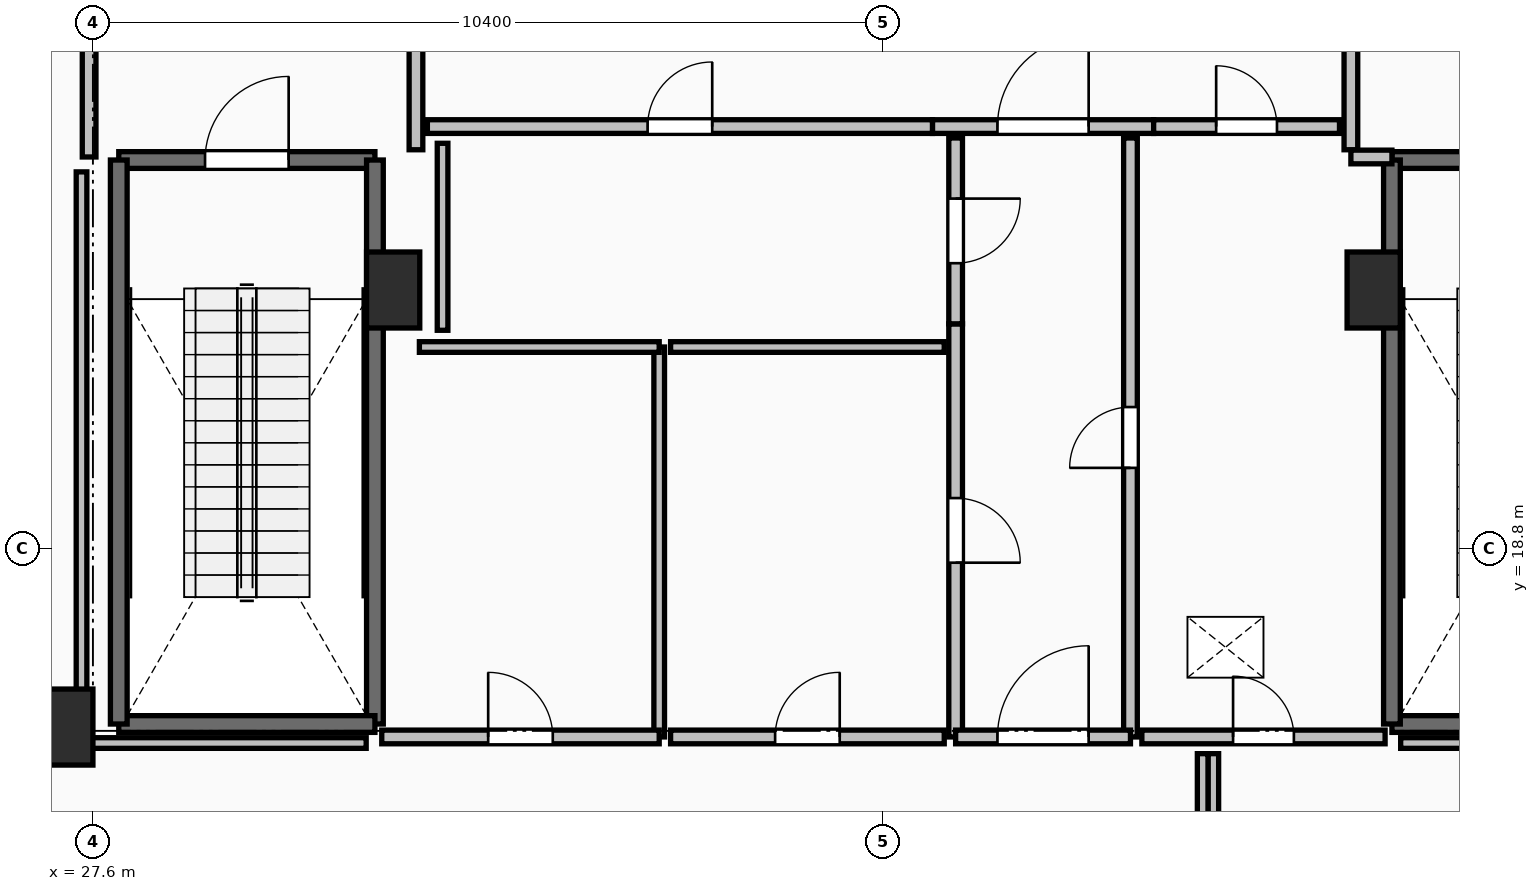
"""IFC4 building model, lengths in metres.
Left out: names, types, materials, properties, quantities, classifications, styles, units other than length and angle.
Written with IfcOpenShell. Run it as: python <this file> out.ifc"""

import sys

from ifc_helpers import new_model, si_unit, direction, frame, frame_2d, origin, origin_2d, place, context, subcontext, project, spatial, rectangle, extrude, element, fill, save


model = new_model("IFC4")
c1 = context("Model", 3, precision=1e-05, world=origin(), true_north=direction((0.0, 1.0)))
c2 = subcontext(c1, "Body", "Model", "MODEL_VIEW")
j1 = project(units=[si_unit("LENGTHUNIT", "METRE"), si_unit("PLANEANGLEUNIT", "RADIAN")], contexts=[c1])
p1 = place(None, origin())
s1 = spatial("IfcSite", under=j1, at=p1, CompositionType="ELEMENT")
p2 = place(p1, origin())
s2 = spatial("IfcBuilding", under=s1, at=p2, CompositionType="ELEMENT")
p3 = place(p2, frame((0.0, 0.0, 290.4)))
s3 = spatial("IfcBuildingStorey", under=s2, at=p3, CompositionType="ELEMENT", Elevation=290.4)
for number, where, z_axis, x_axis in (
    (1, (27.25, 16.45, 0.0), (0.0, 0.0, 1.0), (1.0, 0.0, 0.0)),
    (2, (31.55, 22.2, 0.0), (0.0, 0.0, 1.0), (1.0, 0.0, 0.0)),
    (3, (44.45, 22.2, 0.0), (0.0, 0.0, 1.0), (1.0, 0.0, 0.0)),
):
    element("IfcColumn", number, at=place(p3, frame(where, z_axis=z_axis, x_axis=x_axis)), inside=s3, PredefinedType="PILASTER", context=c2, shape_type="SweptSolid", body=[
        extrude(rectangle(XDim=0.7, YDim=1.0, at=origin_2d()), origin(), (0.0, 0.0, 1.0), 5.0),
    ])
p4 = place(p3, frame((27.94, 23.91, 0.0), z_axis=(0.0, 0.0, 1.0), x_axis=(1.0, 0.0, 0.0)))
e4 = element("IfcWall", 4, at=p4, inside=s3, PredefinedType="SOLIDWALL", context=c2, shape_type="SweptSolid", body=[
    extrude(rectangle(XDim=3.37, YDim=0.22, at=frame_2d((1.685, 0.0))), origin(), (0.0, 0.0, 1.0), 4.72),
])
p5 = place(p4, frame((1.135, 0.0, 0.0)))
e5 = element("IfcOpeningElement", 5, at=p5, cuts=e4, PredefinedType="OPENING", context=c2, shape_type="SweptSolid", body=[
    extrude(rectangle(XDim=1.1, YDim=2.15, at=frame_2d((0.55, 1.075))), frame((0.0, 0.125, 0.0), z_axis=(0.0, -1.0, 0.0), x_axis=(1.0, 0.0, 0.0)), (0.0, 0.0, 1.0), 0.25),
])
p6 = place(p3, frame((31.31, 23.91, 0.0), z_axis=(0.0, 0.0, 1.0), x_axis=(0.0, -1.0, 0.0)))
e6 = element("IfcWall", 6, at=p6, inside=s3, PredefinedType="SOLIDWALL", context=c2, shape_type="SweptSolid", body=[
    extrude(rectangle(XDim=7.42, YDim=0.22, at=frame_2d((3.71, 0.0))), origin(), (0.0, 0.0, 1.0), 4.72),
])
p7 = place(p3, frame((31.31, 16.49, 0.0), z_axis=(0.0, 0.0, 1.0), x_axis=(-1.0, 0.0, 0.0)))
e7 = element("IfcWall", 7, at=p7, inside=s3, PredefinedType="SOLIDWALL", context=c2, shape_type="SweptSolid", body=[
    extrude(rectangle(XDim=3.37, YDim=0.22, at=frame_2d((1.685, 0.0))), origin(), (0.0, 0.0, 1.0), 4.72),
])
p8 = place(p3, frame((27.94, 16.49, 0.0), z_axis=(0.0, 0.0, 1.0), x_axis=(0.0, 1.0, 0.0)))
e8 = element("IfcWall", 8, at=p8, inside=s3, PredefinedType="SOLIDWALL", context=c2, shape_type="SweptSolid", body=[
    extrude(rectangle(XDim=7.42, YDim=0.22, at=frame_2d((3.71, 0.0))), origin(), (0.0, 0.0, 1.0), 4.72),
])
p9 = place(p3, frame((44.69, 23.91, 0.0), z_axis=(0.0, 0.0, 1.0), x_axis=(1.0, 0.0, 0.0)))
e9 = element("IfcWall", 9, at=p9, inside=s3, PredefinedType="SOLIDWALL", context=c2, shape_type="SweptSolid", body=[
    extrude(rectangle(XDim=3.37, YDim=0.22, at=frame_2d((1.685, 0.0))), origin(), (0.0, 0.0, 1.0), 4.72),
])
p10 = place(p9, frame((1.135, 0.0, 0.0)))
e10 = element("IfcOpeningElement", 10, at=p10, cuts=e9, PredefinedType="OPENING", context=c2, shape_type="SweptSolid", body=[
    extrude(rectangle(XDim=1.1, YDim=2.15, at=frame_2d((0.55, 1.075))), frame((0.0, 0.125, 0.0), z_axis=(0.0, -1.0, 0.0), x_axis=(1.0, 0.0, 0.0)), (0.0, 0.0, 1.0), 0.25),
])
p11 = place(p3, frame((48.06, 16.49, 0.0), z_axis=(0.0, 0.0, 1.0), x_axis=(-1.0, 0.0, 0.0)))
e11 = element("IfcWall", 11, at=p11, inside=s3, PredefinedType="SOLIDWALL", context=c2, shape_type="SweptSolid", body=[
    extrude(rectangle(XDim=3.37, YDim=0.22, at=frame_2d((1.685, 0.0))), origin(), (0.0, 0.0, 1.0), 4.72),
])
p12 = place(p3, frame((44.69, 16.49, 0.0), z_axis=(0.0, 0.0, 1.0), x_axis=(0.0, 1.0, 0.0)))
e12 = element("IfcWall", 12, at=p12, inside=s3, PredefinedType="SOLIDWALL", context=c2, shape_type="SweptSolid", body=[
    extrude(rectangle(XDim=7.42, YDim=0.22, at=frame_2d((3.71, 0.0))), origin(), (0.0, 0.0, 1.0), 4.72),
])
p13 = place(p3, frame((31.85, 24.045, 0.0), z_axis=(0.0, 0.0, 1.0), x_axis=(0.0, 1.0, 0.0)))
e13 = element("IfcWall", 13, at=p13, inside=s3, PredefinedType="PARTITIONING", context=c2, shape_type="SweptSolid", body=[
    extrude(rectangle(XDim=3.91, YDim=0.18, at=frame_2d((1.955, 0.0))), origin(), (0.0, 0.0, 1.0), 4.72),
])
p14 = place(p13, frame((1.355, 0.0, 0.0)))
e14 = element("IfcOpeningElement", 14, at=p14, cuts=e13, PredefinedType="OPENING", context=c2, shape_type="SweptSolid", body=[
    extrude(rectangle(XDim=1.2, YDim=2.15, at=frame_2d((0.6, 1.075))), frame((0.0, 0.105, 0.0), z_axis=(0.0, -1.0, 0.0), x_axis=(1.0, 0.0, 0.0)), (0.0, 0.0, 1.0), 0.21),
])
p15 = place(p3, frame((27.55, 28.0, 0.0), z_axis=(0.0, 0.0, 1.0), x_axis=(0.0, -1.0, 0.0)))
e15 = element("IfcWall", 15, at=p15, inside=s3, PredefinedType="PARTITIONING", context=c2, shape_type="SweptSolid", body=[
    extrude(rectangle(XDim=4.05, YDim=0.18, at=frame_2d((2.025, 0.0))), origin(), (0.0, 0.0, 1.0), 4.72),
])
p16 = place(p15, frame((1.425, 0.0, 0.0)))
e16 = element("IfcOpeningElement", 16, at=p16, cuts=e15, PredefinedType="OPENING", context=c2, shape_type="SweptSolid", body=[
    extrude(rectangle(XDim=1.2, YDim=2.15, at=frame_2d((0.6, 1.075))), frame((0.0, 0.105, 0.0), z_axis=(0.0, -1.0, 0.0), x_axis=(1.0, 0.0, 0.0)), (0.0, 0.0, 1.0), 0.21),
])
p17 = place(p3, frame((44.15, 27.955, 0.0), z_axis=(0.0, 0.0, 1.0), x_axis=(0.0, -1.0, 0.0)))
e17 = element("IfcWall", 17, at=p17, inside=s3, PredefinedType="PARTITIONING", context=c2, shape_type="SweptSolid", body=[
    extrude(rectangle(XDim=3.91, YDim=0.18, at=frame_2d((1.955, 0.0))), origin(), (0.0, 0.0, 1.0), 4.72),
])
p18 = place(p17, frame((1.355, 0.0, 0.0)))
e18 = element("IfcOpeningElement", 18, at=p18, cuts=e17, PredefinedType="OPENING", context=c2, shape_type="SweptSolid", body=[
    extrude(rectangle(XDim=1.2, YDim=2.15, at=frame_2d((0.6, 1.075))), frame((0.0, 0.105, 0.0), z_axis=(0.0, -1.0, 0.0), x_axis=(1.0, 0.0, 0.0)), (0.0, 0.0, 1.0), 0.21),
])
p19 = place(p3, frame((44.15, 23.95, 0.0), z_axis=(0.0, 0.0, 1.0), x_axis=(1.0, 0.0, 0.0)))
e19 = element("IfcWall", 19, at=p19, inside=s3, PredefinedType="PARTITIONING", context=c2, shape_type="SweptSolid", body=[
    extrude(rectangle(XDim=0.54, YDim=0.18, at=frame_2d((0.27, 0.0))), origin(), (0.0, 0.0, 1.0), 4.72),
])
p20 = place(p3, frame((38.645, 24.35, 0.0), z_axis=(0.0, 0.0, 1.0), x_axis=(1.0, 0.0, 0.0)))
e20 = element("IfcWall", 20, at=p20, inside=s3, PredefinedType="PARTITIONING", context=c2, shape_type="SweptSolid", body=[
    extrude(rectangle(XDim=2.91, YDim=0.18, at=frame_2d((1.455, 0.0))), origin(), (0.0, 0.0, 1.0), 4.72),
])
p21 = place(p20, frame((0.855, 0.0, 0.0)))
e21 = element("IfcOpeningElement", 21, at=p21, cuts=e20, PredefinedType="OPENING", context=c2, shape_type="SweptSolid", body=[
    extrude(rectangle(XDim=1.2, YDim=2.15, at=frame_2d((0.6, 1.075))), frame((0.0, 0.105, 0.0), z_axis=(0.0, -1.0, 0.0), x_axis=(1.0, 0.0, 0.0)), (0.0, 0.0, 1.0), 0.21),
])
p22 = place(p3, frame((41.555, 24.35, 0.0), z_axis=(0.0, 0.0, 1.0), x_axis=(1.0, 0.0, 0.0)))
e22 = element("IfcWall", 22, at=p22, inside=s3, PredefinedType="PARTITIONING", context=c2, shape_type="SweptSolid", body=[
    extrude(rectangle(XDim=2.445, YDim=0.18, at=frame_2d((1.223, 0.0))), origin(), (0.0, 0.0, 1.0), 4.72),
])
p23 = place(p22, frame((0.823, 0.0, 0.0)))
e23 = element("IfcOpeningElement", 23, at=p23, cuts=e22, PredefinedType="OPENING", context=c2, shape_type="SweptSolid", body=[
    extrude(rectangle(XDim=0.8, YDim=2.05, at=frame_2d((0.4, 1.025))), frame((0.0, 0.105, 0.0), z_axis=(0.0, -1.0, 0.0), x_axis=(1.0, 0.0, 0.0)), (0.0, 0.0, 1.0), 0.21),
])
p24 = place(p3, frame((32.0, 24.35, 0.0), z_axis=(0.0, 0.0, 1.0), x_axis=(1.0, 0.0, 0.0)))
e24 = element("IfcWall", 24, at=p24, inside=s3, PredefinedType="PARTITIONING", context=c2, shape_type="SweptSolid", body=[
    extrude(rectangle(XDim=6.645, YDim=0.18, at=frame_2d((3.323, 0.0))), origin(), (0.0, 0.0, 1.0), 4.72),
])
p25 = place(p24, frame((2.897, 0.0, 0.0)))
e25 = element("IfcOpeningElement", 25, at=p25, cuts=e24, PredefinedType="OPENING", context=c2, shape_type="SweptSolid", body=[
    extrude(rectangle(XDim=0.85, YDim=2.1, at=frame_2d((0.425, 1.05))), frame((0.0, 0.105, 0.0), z_axis=(0.0, -1.0, 0.0), x_axis=(1.0, 0.0, 0.0)), (0.0, 0.0, 1.0), 0.21),
])
p26 = place(p3, frame((41.25, 16.32, 0.0), z_axis=(0.0, 0.0, 1.0), x_axis=(0.0, 1.0, 0.0)))
e26 = element("IfcWall", 26, at=p26, inside=s3, PredefinedType="PARTITIONING", context=c2, shape_type="SweptSolid", body=[
    extrude(rectangle(XDim=7.88, YDim=0.18, at=frame_2d((3.94, 0.0))), origin(), (0.0, 0.0, 1.0), 3.912),
])
p27 = place(p26, frame((3.54, 0.0, 0.0)))
e27 = element("IfcOpeningElement", 27, at=p27, cuts=e26, PredefinedType="OPENING", context=c2, shape_type="SweptSolid", body=[
    extrude(rectangle(XDim=0.8, YDim=2.05, at=frame_2d((0.4, 1.025))), frame((0.0, 0.105, 0.0), z_axis=(0.0, -1.0, 0.0), x_axis=(1.0, 0.0, 0.0)), (0.0, 0.0, 1.0), 0.21),
])
p28 = place(p3, frame((38.95, 21.755, 0.0), z_axis=(0.0, 0.0, 1.0), x_axis=(0.0, -1.0, 0.0)))
e28 = element("IfcWall", 28, at=p28, inside=s3, PredefinedType="PARTITIONING", context=c2, shape_type="SweptSolid", body=[
    extrude(rectangle(XDim=5.435, YDim=0.18, at=frame_2d((2.717, 0.0))), origin(), (0.0, 0.0, 1.0), 4.72),
])
p29 = place(p28, frame((2.292, 0.0, 0.0)))
e29 = element("IfcOpeningElement", 29, at=p29, cuts=e28, PredefinedType="OPENING", context=c2, shape_type="SweptSolid", body=[
    extrude(rectangle(XDim=0.85, YDim=2.1, at=frame_2d((0.425, 1.05))), frame((0.0, 0.105, 0.0), z_axis=(0.0, -1.0, 0.0), x_axis=(1.0, 0.0, 0.0)), (0.0, 0.0, 1.0), 0.21),
])
p30 = place(p3, frame((38.95, 24.2, 0.0), z_axis=(0.0, 0.0, 1.0), x_axis=(0.0, -1.0, 0.0)))
e30 = element("IfcWall", 30, at=p30, inside=s3, PredefinedType="PARTITIONING", context=c2, shape_type="SweptSolid", body=[
    extrude(rectangle(XDim=2.445, YDim=0.18, at=frame_2d((1.223, 0.0))), origin(), (0.0, 0.0, 1.0), 3.912),
])
p31 = place(p30, frame((0.798, 0.0, 0.0)))
e31 = element("IfcOpeningElement", 31, at=p31, cuts=e30, PredefinedType="OPENING", context=c2, shape_type="SweptSolid", body=[
    extrude(rectangle(XDim=0.85, YDim=2.1, at=frame_2d((0.425, 1.05))), frame((0.0, 0.105, 0.0), z_axis=(0.0, -1.0, 0.0), x_axis=(1.0, 0.0, 0.0)), (0.0, 0.0, 1.0), 0.21),
])
p32 = place(p3, frame((38.95, 16.32, 0.0), z_axis=(0.0, 0.0, 1.0), x_axis=(1.0, 0.0, 0.0)))
e32 = element("IfcWall", 32, at=p32, inside=s3, PredefinedType="PARTITIONING", context=c2, shape_type="SweptSolid", body=[
    extrude(rectangle(XDim=2.3, YDim=0.18, at=frame_2d((1.15, 0.0))), origin(), (0.0, 0.0, 1.0), 4.72),
])
p33 = place(p32, frame((0.55, 0.0, 0.0)))
e33 = element("IfcOpeningElement", 33, at=p33, cuts=e32, PredefinedType="OPENING", context=c2, shape_type="SweptSolid", body=[
    extrude(rectangle(XDim=1.2, YDim=2.15, at=frame_2d((0.6, 1.075))), frame((0.0, 0.105, 0.0), z_axis=(0.0, -1.0, 0.0), x_axis=(1.0, 0.0, 0.0)), (0.0, 0.0, 1.0), 0.21),
])
p34 = place(p3, frame((41.4, 16.32, 0.0), z_axis=(0.0, 0.0, 1.0), x_axis=(1.0, 0.0, 0.0)))
e34 = element("IfcWall", 34, at=p34, inside=s3, PredefinedType="PARTITIONING", context=c2, shape_type="SweptSolid", body=[
    extrude(rectangle(XDim=3.2, YDim=0.18, at=frame_2d((1.6, 0.0))), origin(), (0.0, 0.0, 1.0), 4.72),
])
p35 = place(p34, frame((1.2, 0.0, 0.0)))
e35 = element("IfcOpeningElement", 35, at=p35, cuts=e34, PredefinedType="OPENING", context=c2, shape_type="SweptSolid", body=[
    extrude(rectangle(XDim=0.8, YDim=2.05, at=frame_2d((0.4, 1.025))), frame((0.0, 0.105, 0.0), z_axis=(0.0, -1.0, 0.0), x_axis=(1.0, 0.0, 0.0)), (0.0, 0.0, 1.0), 0.21),
])
p36 = place(p3, frame((35.05, 16.32, 0.0), z_axis=(0.0, 0.0, 1.0), x_axis=(0.0, 1.0, 0.0)))
e36 = element("IfcWall", 36, at=p36, inside=s3, PredefinedType="PARTITIONING", context=c2, shape_type="SweptSolid", body=[
    extrude(rectangle(XDim=5.13, YDim=0.14, at=frame_2d((2.565, 0.0))), origin(), (0.0, 0.0, 1.0), 4.72),
])
p37 = place(p3, frame((35.05, 21.45, 0.0), z_axis=(0.0, 0.0, 1.0), x_axis=(-1.0, 0.0, 0.0)))
e37 = element("IfcWall", 37, at=p37, inside=s3, PredefinedType="PARTITIONING", context=c2, shape_type="SweptSolid", body=[
    extrude(rectangle(XDim=3.155, YDim=0.14, at=frame_2d((1.578, 0.0))), origin(), (0.0, 0.0, 1.0), 4.72),
])
p38 = place(p3, frame((31.4, 16.32, 0.0), z_axis=(0.0, 0.0, 1.0), x_axis=(1.0, 0.0, 0.0)))
e38 = element("IfcWall", 38, at=p38, inside=s3, PredefinedType="PARTITIONING", context=c2, shape_type="SweptSolid", body=[
    extrude(rectangle(XDim=3.65, YDim=0.18, at=frame_2d((1.825, 0.0))), origin(), (0.0, 0.0, 1.0), 4.72),
])
p39 = place(p38, frame((1.4, 0.0, 0.0)))
e39 = element("IfcOpeningElement", 39, at=p39, cuts=e38, PredefinedType="OPENING", context=c2, shape_type="SweptSolid", body=[
    extrude(rectangle(XDim=0.85, YDim=2.1, at=frame_2d((0.425, 1.05))), frame((0.0, 0.105, 0.0), z_axis=(0.0, -1.0, 0.0), x_axis=(1.0, 0.0, 0.0)), (0.0, 0.0, 1.0), 0.21),
])
p40 = place(p3, frame((38.8, 21.45, 0.0), z_axis=(0.0, 0.0, 1.0), x_axis=(-1.0, 0.0, 0.0)))
e40 = element("IfcWall", 40, at=p40, inside=s3, PredefinedType="PARTITIONING", context=c2, shape_type="SweptSolid", body=[
    extrude(rectangle(XDim=3.6, YDim=0.14, at=frame_2d((1.8, 0.0))), origin(), (0.0, 0.0, 1.0), 4.72),
])
p41 = place(p3, frame((35.2, 16.32, 0.0), z_axis=(0.0, 0.0, 1.0), x_axis=(1.0, 0.0, 0.0)))
e41 = element("IfcWall", 41, at=p41, inside=s3, PredefinedType="PARTITIONING", context=c2, shape_type="SweptSolid", body=[
    extrude(rectangle(XDim=3.6, YDim=0.18, at=frame_2d((1.8, 0.0))), origin(), (0.0, 0.0, 1.0), 4.72),
])
p42 = place(p41, frame((1.375, 0.0, 0.0)))
e42 = element("IfcOpeningElement", 42, at=p42, cuts=e41, PredefinedType="OPENING", context=c2, shape_type="SweptSolid", body=[
    extrude(rectangle(XDim=0.85, YDim=2.1, at=frame_2d((0.425, 1.05))), frame((0.0, 0.105, 0.0), z_axis=(0.0, -1.0, 0.0), x_axis=(1.0, 0.0, 0.0)), (0.0, 0.0, 1.0), 0.21),
])
p43 = place(p3, frame((32.2, 24.13, 0.0), z_axis=(0.0, 0.0, 1.0), x_axis=(0.0, -1.0, 0.0)))
e43 = element("IfcWall", 43, at=p43, inside=s3, PredefinedType="PARTITIONING", context=c2, shape_type="SweptSolid", body=[
    extrude(rectangle(XDim=2.46, YDim=0.14, at=frame_2d((1.23, 0.0))), origin(), (0.0, 0.0, 1.0), 3.912),
])
p44 = place(p3, frame((42.34, 14.27, 0.0), z_axis=(0.0, 0.0, 1.0), x_axis=(0.0, 1.0, 0.0)))
e44 = element("IfcWall", 44, at=p44, inside=s3, PredefinedType="PARTITIONING", context=c2, shape_type="SweptSolid", body=[
    extrude(rectangle(XDim=1.83, YDim=0.14, at=frame_2d((0.915, 0.0))), origin(), (0.0, 0.0, 1.0), 4.72),
])
p45 = place(p3, frame((44.805, 16.24, 0.0), z_axis=(0.0, 0.0, 1.0), x_axis=(1.0, 0.0, 0.0)))
e45 = element("IfcWall", 45, at=p45, inside=s3, PredefinedType="PARTITIONING", context=c2, shape_type="SweptSolid", body=[
    extrude(rectangle(XDim=3.745, YDim=0.14, at=frame_2d((1.873, 0.0))), origin(), (0.0, 0.0, 1.0), 3.912),
])
p46 = place(p3, frame((27.45, 23.754, 0.0), z_axis=(0.0, 0.0, 1.0), x_axis=(0.0, -1.0, 0.0)))
e46 = element("IfcWall", 46, at=p46, inside=s3, PredefinedType="PARTITIONING", context=c2, shape_type="SweptSolid", body=[
    extrude(rectangle(XDim=7.514, YDim=0.14, at=frame_2d((3.757, 0.0))), origin(), (0.0, 0.0, 1.0), 3.912),
])
p47 = place(p3, frame((27.45, 16.24, 0.0), z_axis=(0.0, 0.0, 1.0), x_axis=(1.0, 0.0, 0.0)))
e47 = element("IfcWall", 47, at=p47, inside=s3, PredefinedType="PARTITIONING", context=c2, shape_type="SweptSolid", body=[
    extrude(rectangle(XDim=3.745, YDim=0.14, at=frame_2d((1.873, 0.0))), origin(), (0.0, 0.0, 1.0), 3.912),
])
p48 = place(p3, frame((42.2, 16.1, 0.0), z_axis=(0.0, 0.0, 1.0), x_axis=(0.0, -1.0, 0.0)))
e48 = element("IfcWall", 48, at=p48, inside=s3, PredefinedType="PARTITIONING", context=c2, shape_type="SweptSolid", body=[
    extrude(rectangle(XDim=1.83, YDim=0.14, at=frame_2d((0.915, 0.0))), origin(), (0.0, 0.0, 1.0), 4.72),
])
p49 = place(p5, origin())
e49 = element("IfcDoor", 49, at=p49, inside=s3, OperationType="SINGLE_SWING_RIGHT", PredefinedType="DOOR", context=c2, shape_type="SweptSolid", body=[
    extrude(rectangle(XDim=1.1, YDim=2.15, at=frame_2d((0.55, 1.075))), frame((0.0, 0.025, 0.0), z_axis=(0.0, -1.0, 0.0), x_axis=(1.0, 0.0, 0.0)), (0.0, 0.0, 1.0), 0.05),
])
fill(e5, e49)
p50 = place(p21, origin())
e50 = element("IfcDoor", 50, at=p50, inside=s3, OperationType="SINGLE_SWING_RIGHT", PredefinedType="DOOR", context=c2, shape_type="SweptSolid", body=[
    extrude(rectangle(XDim=1.2, YDim=2.15, at=frame_2d((0.6, 1.075))), frame((0.0, 0.025, 0.0), z_axis=(0.0, -1.0, 0.0), x_axis=(1.0, 0.0, 0.0)), (0.0, 0.0, 1.0), 0.05),
])
fill(e21, e50)
p51 = place(p23, origin())
e51 = element("IfcDoor", 51, at=p51, inside=s3, OperationType="SINGLE_SWING_LEFT", PredefinedType="DOOR", context=c2, shape_type="SweptSolid", body=[
    extrude(rectangle(XDim=0.8, YDim=2.05, at=frame_2d((0.4, 1.025))), frame((0.0, 0.025, 0.0), z_axis=(0.0, -1.0, 0.0), x_axis=(1.0, 0.0, 0.0)), (0.0, 0.0, 1.0), 0.05),
])
fill(e23, e51)
p52 = place(p25, origin())
e52 = element("IfcDoor", 52, at=p52, inside=s3, OperationType="SINGLE_SWING_RIGHT", PredefinedType="DOOR", context=c2, shape_type="SweptSolid", body=[
    extrude(rectangle(XDim=0.85, YDim=2.1, at=frame_2d((0.425, 1.05))), frame((0.0, 0.025, 0.0), z_axis=(0.0, -1.0, 0.0), x_axis=(1.0, 0.0, 0.0)), (0.0, 0.0, 1.0), 0.05),
])
fill(e25, e52)
p53 = place(p27, origin())
e53 = element("IfcDoor", 53, at=p53, inside=s3, OperationType="SINGLE_SWING_LEFT", PredefinedType="DOOR", context=c2, shape_type="SweptSolid", body=[
    extrude(rectangle(XDim=0.8, YDim=2.05, at=frame_2d((0.4, 1.025))), frame((0.0, 0.025, 0.0), z_axis=(0.0, -1.0, 0.0), x_axis=(1.0, 0.0, 0.0)), (0.0, 0.0, 1.0), 0.05),
])
fill(e27, e53)
p54 = place(p29, origin())
e54 = element("IfcDoor", 54, at=p54, inside=s3, OperationType="SINGLE_SWING_RIGHT", PredefinedType="DOOR", context=c2, shape_type="SweptSolid", body=[
    extrude(rectangle(XDim=0.85, YDim=2.1, at=frame_2d((0.425, 1.05))), frame((0.0, 0.025, 0.0), z_axis=(0.0, -1.0, 0.0), x_axis=(1.0, 0.0, 0.0)), (0.0, 0.0, 1.0), 0.05),
])
fill(e29, e54)
p55 = place(p31, origin())
e55 = element("IfcDoor", 55, at=p55, inside=s3, OperationType="SINGLE_SWING_LEFT", PredefinedType="DOOR", context=c2, shape_type="SweptSolid", body=[
    extrude(rectangle(XDim=0.85, YDim=2.1, at=frame_2d((0.425, 1.05))), frame((0.0, 0.025, 0.0), z_axis=(0.0, -1.0, 0.0), x_axis=(1.0, 0.0, 0.0)), (0.0, 0.0, 1.0), 0.05),
])
fill(e31, e55)
p56 = place(p33, origin())
e56 = element("IfcDoor", 56, at=p56, inside=s3, OperationType="SINGLE_SWING_RIGHT", PredefinedType="DOOR", context=c2, shape_type="SweptSolid", body=[
    extrude(rectangle(XDim=1.2, YDim=2.15, at=frame_2d((0.6, 1.075))), frame((0.0, 0.025, 0.0), z_axis=(0.0, -1.0, 0.0), x_axis=(1.0, 0.0, 0.0)), (0.0, 0.0, 1.0), 0.05),
])
fill(e33, e56)
p57 = place(p35, origin())
e57 = element("IfcDoor", 57, at=p57, inside=s3, OperationType="SINGLE_SWING_LEFT", PredefinedType="DOOR", context=c2, shape_type="SweptSolid", body=[
    extrude(rectangle(XDim=0.8, YDim=2.05, at=frame_2d((0.4, 1.025))), frame((0.0, 0.025, 0.0), z_axis=(0.0, -1.0, 0.0), x_axis=(1.0, 0.0, 0.0)), (0.0, 0.0, 1.0), 0.05),
])
fill(e35, e57)
p58 = place(p39, origin())
e58 = element("IfcDoor", 58, at=p58, inside=s3, OperationType="SINGLE_SWING_LEFT", PredefinedType="DOOR", context=c2, shape_type="SweptSolid", body=[
    extrude(rectangle(XDim=0.85, YDim=2.1, at=frame_2d((0.425, 1.05))), frame((0.0, 0.025, 0.0), z_axis=(0.0, -1.0, 0.0), x_axis=(1.0, 0.0, 0.0)), (0.0, 0.0, 1.0), 0.05),
])
fill(e39, e58)
p59 = place(p42, origin())
e59 = element("IfcDoor", 59, at=p59, inside=s3, OperationType="SINGLE_SWING_RIGHT", PredefinedType="DOOR", context=c2, shape_type="SweptSolid", body=[
    extrude(rectangle(XDim=0.85, YDim=2.1, at=frame_2d((0.425, 1.05))), frame((0.0, 0.025, 0.0), z_axis=(0.0, -1.0, 0.0), x_axis=(1.0, 0.0, 0.0)), (0.0, 0.0, 1.0), 0.05),
])
fill(e42, e59)
save(model, sys.argv[1])
